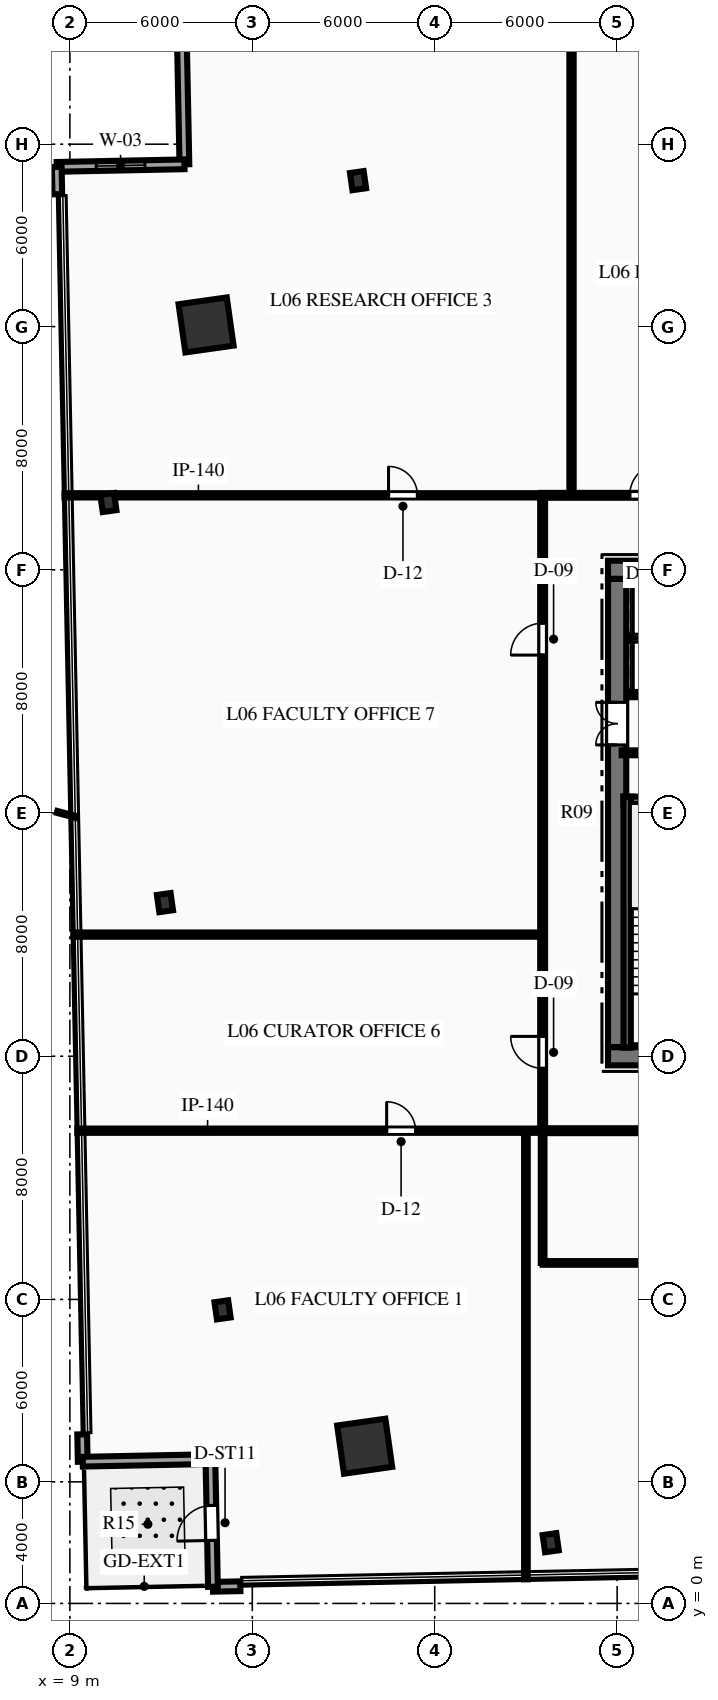
"""IFC4 building model, lengths in metres.
Left out: names, types, materials, properties, quantities, classifications, styles, units other than length and angle.
Written with IfcOpenShell. Run it as: python <this file> out.ifc"""

import sys

from ifc_helpers import new_model, si_unit, direction, frame, frame_2d, origin, origin_2d, place, context, subcontext, project, spatial, rectangle, hollow_rectangle, i_section, extrude, element, fill, save


model = new_model("IFC4")
c1 = context("Model", 3, precision=1e-05, world=origin(), true_north=direction((0.0, 1.0)))
c2 = subcontext(c1, "Body", "Model", "MODEL_VIEW")
j1 = project(units=[si_unit("LENGTHUNIT", "METRE"), si_unit("PLANEANGLEUNIT", "RADIAN")], contexts=[c1])
p1 = place(None, origin())
s1 = spatial("IfcSite", under=j1, at=p1, CompositionType="ELEMENT")
p2 = place(p1, origin())
s2 = spatial("IfcBuilding", under=s1, at=p2, CompositionType="ELEMENT")
p3 = place(p2, frame((0.0, 0.0, 32.7)))
s3 = spatial("IfcBuildingStorey", under=s2, at=p3, CompositionType="ELEMENT", Elevation=32.7)
p4 = place(p3, frame((26.7, 18.0, 0.0), z_axis=(0.0, 0.0, 1.0), x_axis=(1.0, 0.0, 0.0)))
e1 = element("IfcWall", 1, at=p4, inside=s3, PredefinedType="SHEAR", context=c2, shape_type="SweptSolid", body=[
    extrude(rectangle(XDim=18.6, YDim=0.6, at=frame_2d((9.3, 0.0))), origin(), (0.0, 0.0, 1.0), 3.75),
])
p5 = place(p4, frame((7.4, 0.0, 0.0)))
e2 = element("IfcOpeningElement", 2, at=p5, cuts=e1, PredefinedType="OPENING", context=c2, shape_type="SweptSolid", body=[
    extrude(rectangle(XDim=1.1, YDim=2.15, at=frame_2d((0.55, 1.075))), frame((0.0, 0.31, 0.0), z_axis=(0.0, -1.0, 0.0), x_axis=(1.0, 0.0, 0.0)), (0.0, 0.0, 1.0), 0.62),
])
p6 = place(p4, frame((10.1, 0.0, 0.0)))
e3 = element("IfcOpeningElement", 3, at=p6, cuts=e1, PredefinedType="OPENING", context=c2, shape_type="SweptSolid", body=[
    extrude(rectangle(XDim=1.1, YDim=2.15, at=frame_2d((0.55, 1.075))), frame((0.0, 0.31, 0.0), z_axis=(0.0, -1.0, 0.0), x_axis=(1.0, 0.0, 0.0)), (0.0, 0.0, 1.0), 0.62),
])
p7 = place(p3, frame((26.7, 34.0, 0.0), z_axis=(0.0, 0.0, 1.0), x_axis=(1.0, 0.0, 0.0)))
e4 = element("IfcWall", 4, at=p7, inside=s3, PredefinedType="SHEAR", context=c2, shape_type="SweptSolid", body=[
    extrude(rectangle(XDim=18.6, YDim=0.6, at=frame_2d((9.3, 0.0))), origin(), (0.0, 0.0, 1.0), 3.75),
])
p8 = place(p7, frame((1.265, 0.0, 0.0)))
e5 = element("IfcOpeningElement", 5, at=p8, cuts=e4, PredefinedType="OPENING", context=c2, shape_type="SweptSolid", body=[
    extrude(rectangle(XDim=1.1, YDim=2.15, at=frame_2d((0.55, 1.075))), frame((0.0, 0.31, 0.0), z_axis=(0.0, -1.0, 0.0), x_axis=(1.0, 0.0, 0.0)), (0.0, 0.0, 1.0), 0.62),
])
p9 = place(p7, frame((3.515, 0.0, 0.0)))
e6 = element("IfcOpeningElement", 6, at=p9, cuts=e4, PredefinedType="OPENING", context=c2, shape_type="SweptSolid", body=[
    extrude(rectangle(XDim=1.1, YDim=2.15, at=frame_2d((0.55, 1.075))), frame((0.0, 0.31, 0.0), z_axis=(0.0, -1.0, 0.0), x_axis=(1.0, 0.0, 0.0)), (0.0, 0.0, 1.0), 0.62),
])
p10 = place(p7, frame((13.985, 0.0, 0.0)))
e7 = element("IfcOpeningElement", 7, at=p10, cuts=e4, PredefinedType="OPENING", context=c2, shape_type="SweptSolid", body=[
    extrude(rectangle(XDim=1.1, YDim=2.15, at=frame_2d((0.55, 1.075))), frame((0.0, 0.31, 0.0), z_axis=(0.0, -1.0, 0.0), x_axis=(1.0, 0.0, 0.0)), (0.0, 0.0, 1.0), 0.62),
])
p11 = place(p7, frame((16.235, 0.0, 0.0)))
e8 = element("IfcOpeningElement", 8, at=p11, cuts=e4, PredefinedType="OPENING", context=c2, shape_type="SweptSolid", body=[
    extrude(rectangle(XDim=1.1, YDim=2.15, at=frame_2d((0.55, 1.075))), frame((0.0, 0.31, 0.0), z_axis=(0.0, -1.0, 0.0), x_axis=(1.0, 0.0, 0.0)), (0.0, 0.0, 1.0), 0.62),
])
p12 = place(p3, frame((27.0, 18.3, 0.0), z_axis=(0.0, 0.0, 1.0), x_axis=(0.0, 1.0, 0.0)))
e9 = element("IfcWall", 9, at=p12, inside=s3, PredefinedType="SHEAR", context=c2, shape_type="SweptSolid", body=[
    extrude(rectangle(XDim=15.4, YDim=0.6, at=frame_2d((7.7, 0.0))), origin(), (0.0, 0.0, 1.0), 3.75),
])
p13 = place(p12, frame((9.94, 0.0, 0.0)))
e10 = element("IfcOpeningElement", 10, at=p13, cuts=e9, PredefinedType="OPENING", context=c2, shape_type="SweptSolid", body=[
    extrude(rectangle(XDim=1.4, YDim=2.2, at=frame_2d((0.7, 1.1))), frame((0.0, 0.31, 0.0), z_axis=(0.0, -1.0, 0.0), x_axis=(1.0, 0.0, 0.0)), (0.0, 0.0, 1.0), 0.62),
])
p14 = place(p3, frame((27.21, 26.42, 0.0), z_axis=(0.0, 0.0, 1.0), x_axis=(1.0, 0.0, 0.0)))
e11 = element("IfcWall", 11, at=p14, inside=s3, PredefinedType="SHEAR", context=c2, shape_type="SweptSolid", body=[
    extrude(rectangle(XDim=3.98, YDim=0.24, at=frame_2d((1.99, 0.0))), origin(), (0.0, 0.0, 1.0), 3.75),
])
p15 = place(p3, frame((27.33, 18.28, 0.0), z_axis=(0.0, 0.0, 1.0), x_axis=(0.0, 1.0, 0.0)))
e12 = element("IfcWall", 12, at=p15, inside=s3, PredefinedType="SHEAR", context=c2, shape_type="SweptSolid", body=[
    extrude(rectangle(XDim=8.26, YDim=0.24, at=frame_2d((4.13, 0.0))), origin(), (0.0, 0.0, 1.0), 3.75),
])
for number, where, z_axis, x_axis in (
    (13, (18.696, 5.172, 0.0), (0.0, 0.0, 1.0), (0.99, 0.14, 0.0)),
    (14, (13.48, 42.054, 0.0), (0.0, 0.0, 1.0), (0.99, 0.14, 0.0)),
):
    element("IfcColumn", number, at=place(p3, frame(where, z_axis=z_axis, x_axis=x_axis)), inside=s3, PredefinedType="COLUMN", context=c2, shape_type="SweptSolid", body=[
        extrude(hollow_rectangle(XDim=1.6, YDim=1.6, WallThickness=0.08, at=origin_2d()), origin(), (0.0, 0.0, 1.0), 3.75),
    ])
for number, where, z_axis, x_axis in (
    (15, (24.815, 1.997, 0.0), (0.0, 0.0, 1.0), (0.99, 0.14, 0.0)),
    (16, (18.479, 46.801, 0.0), (0.0, 0.0, 1.0), (0.99, 0.14, 0.0)),
    (17, (10.266, 36.213, 0.0), (0.0, 0.0, 1.0), (0.99, 0.14, 0.0)),
    (18, (12.127, 23.053, 0.0), (0.0, 0.0, 1.0), (0.99, 0.14, 0.0)),
    (19, (14.022, 9.657, 0.0), (0.0, 0.0, 1.0), (0.99, 0.14, 0.0)),
):
    element("IfcColumn", number, at=place(p3, frame(where, z_axis=z_axis, x_axis=x_axis)), inside=s3, PredefinedType="COLUMN", context=c2, shape_type="SweptSolid", body=[
        extrude(i_section(OverallWidth=0.454, OverallDepth=0.569, WebThickness=0.078, FlangeThickness=0.125, at=origin_2d()), origin(), (0.0, 0.0, 1.0), 3.75),
    ])
p16 = place(p3, frame((14.606, 0.565, 0.0), z_axis=(0.0, 0.0, 1.0), x_axis=(-0.999798538749, -0.020071918575, 0.0)))
e20 = element("IfcWall", 20, at=p16, inside=s3, PredefinedType="STANDARD", context=c2, shape_type="SweptSolid", body=[
    extrude(rectangle(XDim=0.9, YDim=0.32, at=frame_2d((0.45, 0.0))), origin(), (0.0, 0.0, 1.0), 3.44),
])
p17 = place(p3, frame((12.767, 47.338, 0.0), z_axis=(0.0, 0.0, 1.0), x_axis=(-0.020054105767, 0.9997988962, 0.0)))
e21 = element("IfcWall", 21, at=p17, inside=s3, PredefinedType="STANDARD", context=c2, shape_type="SweptSolid", body=[
    extrude(rectangle(XDim=4.2, YDim=0.32, at=frame_2d((2.1, 0.0))), origin(), (0.0, 0.0, 1.0), 3.44),
])
p18 = place(p3, frame((8.568, 47.254, 0.0), z_axis=(0.0, 0.0, 1.0), x_axis=(0.9997988962, 0.020054105767, 0.0)))
e22 = element("IfcWall", 22, at=p18, inside=s3, PredefinedType="STANDARD", context=c2, shape_type="SweptSolid", body=[
    extrude(rectangle(XDim=4.2, YDim=0.32, at=frame_2d((2.1, 0.0))), origin(), (0.0, 0.0, 1.0), 3.44),
])
p19 = place(p18, frame((1.3, 0.0, 0.85)))
e23 = element("IfcOpeningElement", 23, at=p19, cuts=e22, PredefinedType="OPENING", context=c2, shape_type="SweptSolid", body=[
    extrude(rectangle(XDim=1.6, YDim=2.1, at=frame_2d((0.8, 1.05))), frame((0.0, 0.17, 0.0), z_axis=(0.0, -1.0, 0.0), x_axis=(1.0, 0.0, 0.0)), (0.0, 0.0, 1.0), 0.34),
])
for number, where, z_axis, x_axis in (
    (24, (9.423, 4.662, 0.0), (0.0, 0.0, 1.0), (-0.02, 1.0, 0.0)),
    (25, (8.586, 46.354, 0.0), (0.0, 0.0, 1.0), (-0.02, 1.0, 0.0)),
):
    element("IfcWall", number, at=place(p3, frame(where, z_axis=z_axis, x_axis=x_axis)), inside=s3, PredefinedType="STANDARD", context=c2, shape_type="SweptSolid", body=[
        extrude(rectangle(XDim=0.9, YDim=0.32, at=frame_2d((0.45, 0.0))), origin(), (0.0, 0.0, 1.0), 3.44),
    ])
p20 = place(p3, frame((13.622, 4.747, 0.0), z_axis=(0.0, 0.0, 1.0), x_axis=(-0.9997988962, -0.020054105767, 0.0)))
e26 = element("IfcWall", 26, at=p20, inside=s3, PredefinedType="STANDARD", context=c2, shape_type="SweptSolid", body=[
    extrude(rectangle(XDim=4.2, YDim=0.32, at=frame_2d((2.1, 0.0))), origin(), (0.0, 0.0, 1.0), 3.44),
])
p21 = place(p3, frame((13.706, 0.547, 0.0), z_axis=(0.0, 0.0, 1.0), x_axis=(-0.020054105767, 0.9997988962, 0.0)))
e27 = element("IfcWall", 27, at=p21, inside=s3, PredefinedType="STANDARD", context=c2, shape_type="SweptSolid", body=[
    extrude(rectangle(XDim=4.2, YDim=0.32, at=frame_2d((2.1, 0.0))), origin(), (0.0, 0.0, 1.0), 3.44),
])
p22 = place(p21, frame((1.525, 0.0, 0.0)))
e28 = element("IfcOpeningElement", 28, at=p22, cuts=e27, PredefinedType="OPENING", context=c2, shape_type="SweptSolid", body=[
    extrude(rectangle(XDim=1.15, YDim=2.2, at=frame_2d((0.575, 1.1))), frame((0.0, 0.17, 0.0), z_axis=(0.0, -1.0, 0.0), x_axis=(1.0, 0.0, 0.0)), (0.0, 0.0, 1.0), 0.34),
])
p23 = place(p3, frame((27.15, 27.98, 0.0), z_axis=(0.0, 0.0, 1.0), x_axis=(1.0, 0.0, 0.0)))
e29 = element("IfcWall", 29, at=p23, inside=s3, PredefinedType="PARTITIONING", context=c2, shape_type="SweptSolid", body=[
    extrude(rectangle(XDim=4.05, YDim=0.16, at=frame_2d((2.025, 0.0))), origin(), (0.0, 0.0, 1.0), 3.44),
])
p24 = place(p23, frame((1.625, 0.0, 0.0)))
e30 = element("IfcOpeningElement", 30, at=p24, cuts=e29, PredefinedType="OPENING", context=c2, shape_type="SweptSolid", body=[
    extrude(rectangle(XDim=0.95, YDim=2.15, at=frame_2d((0.475, 1.075))), frame((0.0, 0.09, 0.0), z_axis=(0.0, -1.0, 0.0), x_axis=(1.0, 0.0, 0.0)), (0.0, 0.0, 1.0), 0.18),
])
p25 = place(p3, frame((27.45, 29.9, 0.0), z_axis=(0.0, 0.0, 1.0), x_axis=(1.0, 0.0, 0.0)))
e31 = element("IfcWall", 31, at=p25, inside=s3, PredefinedType="PARTITIONING", context=c2, shape_type="SweptSolid", body=[
    extrude(rectangle(XDim=4.43, YDim=0.18, at=frame_2d((2.215, 0.0))), origin(), (0.0, 0.0, 1.0), 3.44),
])
p26 = place(p25, frame((0.515, 0.0, 0.0)))
e32 = element("IfcOpeningElement", 32, at=p26, cuts=e31, PredefinedType="OPENING", context=c2, shape_type="SweptSolid", body=[
    extrude(rectangle(XDim=1.1, YDim=2.15, at=frame_2d((0.55, 1.075))), frame((0.0, 0.1, 0.0), z_axis=(0.0, -1.0, 0.0), x_axis=(1.0, 0.0, 0.0)), (0.0, 0.0, 1.0), 0.2),
])
p27 = place(p25, frame((2.765, 0.0, 0.0)))
e33 = element("IfcOpeningElement", 33, at=p27, cuts=e31, PredefinedType="OPENING", context=c2, shape_type="SweptSolid", body=[
    extrude(rectangle(XDim=1.1, YDim=2.15, at=frame_2d((0.55, 1.075))), frame((0.0, 0.1, 0.0), z_axis=(0.0, -1.0, 0.0), x_axis=(1.0, 0.0, 0.0)), (0.0, 0.0, 1.0), 0.2),
])
p28 = place(p3, frame((27.45, 31.75, 0.0), z_axis=(0.0, 0.0, 1.0), x_axis=(1.0, 0.0, 0.0)))
e34 = element("IfcWall", 34, at=p28, inside=s3, PredefinedType="PARTITIONING", context=c2, shape_type="SweptSolid", body=[
    extrude(rectangle(XDim=4.43, YDim=0.18, at=frame_2d((2.215, 0.0))), origin(), (0.0, 0.0, 1.0), 3.44),
])
p29 = place(p3, frame((24.5, 15.55, 0.0), z_axis=(0.0, 0.0, 1.0), x_axis=(1.0, 0.0, 0.0)))
e35 = element("IfcWall", 35, at=p29, inside=s3, PredefinedType="PARTITIONING", context=c2, shape_type="SweptSolid", body=[
    extrude(rectangle(XDim=23.0, YDim=0.16, at=frame_2d((11.5, 0.0))), origin(), (0.0, 0.0, 1.0), 3.44),
])
p30 = place(p29, frame((3.525, 0.0, 0.0)))
e36 = element("IfcOpeningElement", 36, at=p30, cuts=e35, PredefinedType="OPENING", context=c2, shape_type="SweptSolid", body=[
    extrude(rectangle(XDim=0.95, YDim=2.15, at=frame_2d((0.475, 1.075))), frame((0.0, 0.09, 0.0), z_axis=(0.0, -1.0, 0.0), x_axis=(1.0, 0.0, 0.0)), (0.0, 0.0, 1.0), 0.18),
])
p31 = place(p29, frame((18.151, 0.0, 0.0)))
e37 = element("IfcOpeningElement", 37, at=p31, cuts=e35, PredefinedType="OPENING", context=c2, shape_type="SweptSolid", body=[
    extrude(rectangle(XDim=1.05, YDim=2.15, at=frame_2d((0.525, 1.075))), frame((0.0, 0.09, 0.0), z_axis=(0.0, -1.0, 0.0), x_axis=(1.0, 0.0, 0.0)), (0.0, 0.0, 1.0), 0.18),
])
p32 = place(p3, frame((24.5, 36.45, 0.0), z_axis=(0.0, 0.0, 1.0), x_axis=(1.0, 0.0, 0.0)))
e38 = element("IfcWall", 38, at=p32, inside=s3, PredefinedType="PARTITIONING", context=c2, shape_type="SweptSolid", body=[
    extrude(rectangle(XDim=23.0, YDim=0.16, at=frame_2d((11.5, 0.0))), origin(), (0.0, 0.0, 1.0), 3.44),
])
p33 = place(p32, frame((13.75, 0.0, 0.0)))
e39 = element("IfcOpeningElement", 39, at=p33, cuts=e38, PredefinedType="OPENING", context=c2, shape_type="SweptSolid", body=[
    extrude(rectangle(XDim=0.9, YDim=2.15, at=frame_2d((0.45, 1.075))), frame((0.0, 0.09, 0.0), z_axis=(0.0, -1.0, 0.0), x_axis=(1.0, 0.0, 0.0)), (0.0, 0.0, 1.0), 0.18),
])
p34 = place(p32, frame((16.05, 0.0, 0.0)))
e40 = element("IfcOpeningElement", 40, at=p34, cuts=e38, PredefinedType="OPENING", context=c2, shape_type="SweptSolid", body=[
    extrude(rectangle(XDim=0.9, YDim=2.15, at=frame_2d((0.45, 1.075))), frame((0.0, 0.09, 0.0), z_axis=(0.0, -1.0, 0.0), x_axis=(1.0, 0.0, 0.0)), (0.0, 0.0, 1.0), 0.18),
])
p35 = place(p32, frame((18.3, 0.0, 0.0)))
e41 = element("IfcOpeningElement", 41, at=p35, cuts=e38, PredefinedType="OPENING", context=c2, shape_type="SweptSolid", body=[
    extrude(rectangle(XDim=1.0, YDim=2.15, at=frame_2d((0.5, 1.075))), frame((0.0, 0.09, 0.0), z_axis=(0.0, -1.0, 0.0), x_axis=(1.0, 0.0, 0.0)), (0.0, 0.0, 1.0), 0.18),
])
p36 = place(p32, frame((2.915, 0.0, 0.0)))
e42 = element("IfcOpeningElement", 42, at=p36, cuts=e38, PredefinedType="OPENING", context=c2, shape_type="SweptSolid", body=[
    extrude(rectangle(XDim=1.05, YDim=2.15, at=frame_2d((0.525, 1.075))), frame((0.0, 0.09, 0.0), z_axis=(0.0, -1.0, 0.0), x_axis=(1.0, 0.0, 0.0)), (0.0, 0.0, 1.0), 0.18),
])
p37 = place(p32, frame((11.335, 0.0, 0.0)))
e43 = element("IfcOpeningElement", 43, at=p37, cuts=e38, PredefinedType="OPENING", context=c2, shape_type="SweptSolid", body=[
    extrude(rectangle(XDim=1.05, YDim=2.15, at=frame_2d((0.525, 1.075))), frame((0.0, 0.09, 0.0), z_axis=(0.0, -1.0, 0.0), x_axis=(1.0, 0.0, 0.0)), (0.0, 0.0, 1.0), 0.18),
])
p38 = place(p3, frame((24.55, 15.55, 0.0), z_axis=(0.0, 0.0, 1.0), x_axis=(0.0, 1.0, 0.0)))
e44 = element("IfcWall", 44, at=p38, inside=s3, PredefinedType="PARTITIONING", context=c2, shape_type="SweptSolid", body=[
    extrude(rectangle(XDim=20.9, YDim=0.16, at=frame_2d((10.45, 0.0))), origin(), (0.0, 0.0, 1.0), 3.44),
])
p39 = place(p38, frame((2.052, 0.0, 0.0)))
e45 = element("IfcOpeningElement", 45, at=p39, cuts=e44, PredefinedType="OPENING", context=c2, shape_type="SweptSolid", body=[
    extrude(rectangle(XDim=1.05, YDim=2.15, at=frame_2d((0.525, 1.075))), frame((0.0, 0.09, 0.0), z_axis=(0.0, -1.0, 0.0), x_axis=(1.0, 0.0, 0.0)), (0.0, 0.0, 1.0), 0.18),
])
p40 = place(p38, frame((15.645, 0.0, 0.0)))
e46 = element("IfcOpeningElement", 46, at=p40, cuts=e44, PredefinedType="OPENING", context=c2, shape_type="SweptSolid", body=[
    extrude(rectangle(XDim=1.05, YDim=2.15, at=frame_2d((0.525, 1.075))), frame((0.0, 0.09, 0.0), z_axis=(0.0, -1.0, 0.0), x_axis=(1.0, 0.0, 0.0)), (0.0, 0.0, 1.0), 0.18),
])
p41 = place(p3, frame((9.244, 15.55, 0.0), z_axis=(0.0, 0.0, 1.0), x_axis=(1.0, 0.0, 0.0)))
e47 = element("IfcWall", 47, at=p41, inside=s3, PredefinedType="PARTITIONING", context=c2, shape_type="SweptSolid", body=[
    extrude(rectangle(XDim=15.306, YDim=0.14, at=frame_2d((7.653, 0.0))), origin(), (0.0, 0.0, 1.0), 3.44),
])
p42 = place(p41, frame((10.175, 0.0, 0.0)))
e48 = element("IfcOpeningElement", 48, at=p42, cuts=e47, PredefinedType="OPENING", context=c2, shape_type="SweptSolid", body=[
    extrude(rectangle(XDim=0.95, YDim=2.15, at=frame_2d((0.475, 1.075))), frame((0.0, 0.08, 0.0), z_axis=(0.0, -1.0, 0.0), x_axis=(1.0, 0.0, 0.0)), (0.0, 0.0, 1.0), 0.16),
])
p43 = place(p3, frame((8.825, 36.45, 0.0), z_axis=(0.0, 0.0, 1.0), x_axis=(1.0, 0.0, 0.0)))
e49 = element("IfcWall", 49, at=p43, inside=s3, PredefinedType="PARTITIONING", context=c2, shape_type="SweptSolid", body=[
    extrude(rectangle(XDim=15.725, YDim=0.14, at=frame_2d((7.863, 0.0))), origin(), (0.0, 0.0, 1.0), 2.739),
])
p44 = place(p43, frame((10.656, 0.0, 0.0)))
e50 = element("IfcOpeningElement", 50, at=p44, cuts=e49, PredefinedType="OPENING", context=c2, shape_type="SweptSolid", body=[
    extrude(rectangle(XDim=0.95, YDim=2.15, at=frame_2d((0.475, 1.075))), frame((0.0, 0.08, 0.0), z_axis=(0.0, -1.0, 0.0), x_axis=(1.0, 0.0, 0.0)), (0.0, 0.0, 1.0), 0.16),
])
p45 = place(p3, frame((24.0, 0.794, 0.0), z_axis=(0.0, 0.0, 1.0), x_axis=(0.0, 1.0, 0.0)))
e51 = element("IfcWall", 51, at=p45, inside=s3, PredefinedType="PARTITIONING", context=c2, shape_type="SweptSolid", body=[
    extrude(rectangle(XDim=14.756, YDim=0.12, at=frame_2d((7.378, 0.0))), origin(), (0.0, 0.0, 1.0), 3.44),
])
p46 = place(p3, frame((25.5, 36.45, 0.0), z_axis=(0.0, 0.0, 1.0), x_axis=(0.0, 1.0, 0.0)))
e52 = element("IfcWall", 52, at=p46, inside=s3, PredefinedType="PARTITIONING", context=c2, shape_type="SweptSolid", body=[
    extrude(rectangle(XDim=15.304, YDim=0.14, at=frame_2d((7.652, 0.0))), origin(), (0.0, 0.0, 1.0), 3.44),
])
p47 = place(p3, frame((9.115, 22.0, 0.0), z_axis=(0.0, 0.0, 1.0), x_axis=(1.0, 0.0, 0.0)))
e53 = element("IfcWall", 53, at=p47, inside=s3, PredefinedType="PARTITIONING", context=c2, shape_type="SweptSolid", body=[
    extrude(rectangle(XDim=15.435, YDim=0.14, at=frame_2d((7.718, 0.0))), origin(), (0.0, 0.0, 1.0), 3.44),
])
p48 = place(p3, frame((24.55, 11.2, 0.0), z_axis=(0.0, 0.0, 1.0), x_axis=(0.0, 1.0, 0.0)))
e54 = element("IfcWall", 54, at=p48, inside=s3, PredefinedType="PARTITIONING", context=c2, shape_type="SweptSolid", body=[
    extrude(rectangle(XDim=4.35, YDim=0.12, at=frame_2d((2.175, 0.0))), origin(), (0.0, 0.0, 1.0), 3.44),
])
p49 = place(p3, frame((24.55, 11.2, 0.0), z_axis=(0.0, 0.0, 1.0), x_axis=(1.0, 0.0, 0.0)))
e55 = element("IfcWall", 55, at=p49, inside=s3, PredefinedType="PARTITIONING", context=c2, shape_type="SweptSolid", body=[
    extrude(rectangle(XDim=9.85, YDim=0.12, at=frame_2d((4.925, 0.0))), origin(), (0.0, 0.0, 1.0), 3.44),
])
p50 = place(p49, frame((4.975, 0.0, 0.0)))
e56 = element("IfcOpeningElement", 56, at=p50, cuts=e55, PredefinedType="OPENING", context=c2, shape_type="SweptSolid", body=[
    extrude(rectangle(XDim=0.95, YDim=2.15, at=frame_2d((0.475, 1.075))), frame((0.0, 0.07, 0.0), z_axis=(0.0, -1.0, 0.0), x_axis=(1.0, 0.0, 0.0)), (0.0, 0.0, 1.0), 0.14),
])
p51 = place(p19, origin())
e57 = element("IfcWindow", 57, at=p51, inside=s3, PartitioningType="SINGLE_PANEL", PredefinedType="WINDOW", context=c2, shape_type="SweptSolid", body=[
    extrude(rectangle(XDim=1.6, YDim=2.1, at=frame_2d((0.8, 1.05))), frame((0.0, 0.03, 0.0), z_axis=(0.0, -1.0, 0.0), x_axis=(1.0, 0.0, 0.0)), (0.0, 0.0, 1.0), 0.06),
])
fill(e23, e57)
p52 = place(p22, origin())
e58 = element("IfcDoor", 58, at=p52, inside=s3, OperationType="SINGLE_SWING_LEFT", PredefinedType="DOOR", context=c2, shape_type="SweptSolid", body=[
    extrude(rectangle(XDim=1.15, YDim=2.2, at=frame_2d((0.575, 1.1))), frame((0.0, 0.025, 0.0), z_axis=(0.0, -1.0, 0.0), x_axis=(1.0, 0.0, 0.0)), (0.0, 0.0, 1.0), 0.05),
])
fill(e28, e58)
p53 = place(p13, origin())
e59 = element("IfcDoor", 59, at=p53, inside=s3, OperationType="DOUBLE_DOOR_SINGLE_SWING", PredefinedType="DOOR", context=c2, shape_type="SweptSolid", body=[
    extrude(rectangle(XDim=1.4, YDim=2.2, at=frame_2d((0.7, 1.1))), frame((0.0, 0.025, 0.0), z_axis=(0.0, -1.0, 0.0), x_axis=(1.0, 0.0, 0.0)), (0.0, 0.0, 1.0), 0.05),
])
fill(e10, e59)
p54 = place(p42, origin())
e60 = element("IfcDoor", 60, at=p54, inside=s3, OperationType="SINGLE_SWING_LEFT", PredefinedType="DOOR", context=c2, shape_type="SweptSolid", body=[
    extrude(rectangle(XDim=0.95, YDim=2.15, at=frame_2d((0.475, 1.075))), frame((0.0, 0.025, 0.0), z_axis=(0.0, -1.0, 0.0), x_axis=(1.0, 0.0, 0.0)), (0.0, 0.0, 1.0), 0.05),
])
fill(e48, e60)
p55 = place(p44, origin())
e61 = element("IfcDoor", 61, at=p55, inside=s3, OperationType="SINGLE_SWING_LEFT", PredefinedType="DOOR", context=c2, shape_type="SweptSolid", body=[
    extrude(rectangle(XDim=0.95, YDim=2.15, at=frame_2d((0.475, 1.075))), frame((0.0, 0.025, 0.0), z_axis=(0.0, -1.0, 0.0), x_axis=(1.0, 0.0, 0.0)), (0.0, 0.0, 1.0), 0.05),
])
fill(e50, e61)
p56 = place(p36, origin())
e62 = element("IfcDoor", 62, at=p56, inside=s3, OperationType="SINGLE_SWING_RIGHT", PredefinedType="DOOR", context=c2, shape_type="SweptSolid", body=[
    extrude(rectangle(XDim=1.05, YDim=2.15, at=frame_2d((0.525, 1.075))), frame((0.0, 0.025, 0.0), z_axis=(0.0, -1.0, 0.0), x_axis=(1.0, 0.0, 0.0)), (0.0, 0.0, 1.0), 0.05),
])
fill(e42, e62)
p57 = place(p39, origin())
e63 = element("IfcDoor", 63, at=p57, inside=s3, OperationType="SINGLE_SWING_RIGHT", PredefinedType="DOOR", context=c2, shape_type="SweptSolid", body=[
    extrude(rectangle(XDim=1.05, YDim=2.15, at=frame_2d((0.525, 1.075))), frame((0.0, 0.025, 0.0), z_axis=(0.0, -1.0, 0.0), x_axis=(1.0, 0.0, 0.0)), (0.0, 0.0, 1.0), 0.05),
])
fill(e45, e63)
p58 = place(p40, origin())
e64 = element("IfcDoor", 64, at=p58, inside=s3, OperationType="SINGLE_SWING_LEFT", PredefinedType="DOOR", context=c2, shape_type="SweptSolid", body=[
    extrude(rectangle(XDim=1.05, YDim=2.15, at=frame_2d((0.525, 1.075))), frame((0.0, 0.025, 0.0), z_axis=(0.0, -1.0, 0.0), x_axis=(1.0, 0.0, 0.0)), (0.0, 0.0, 1.0), 0.05),
])
fill(e46, e64)
save(model, sys.argv[1])
